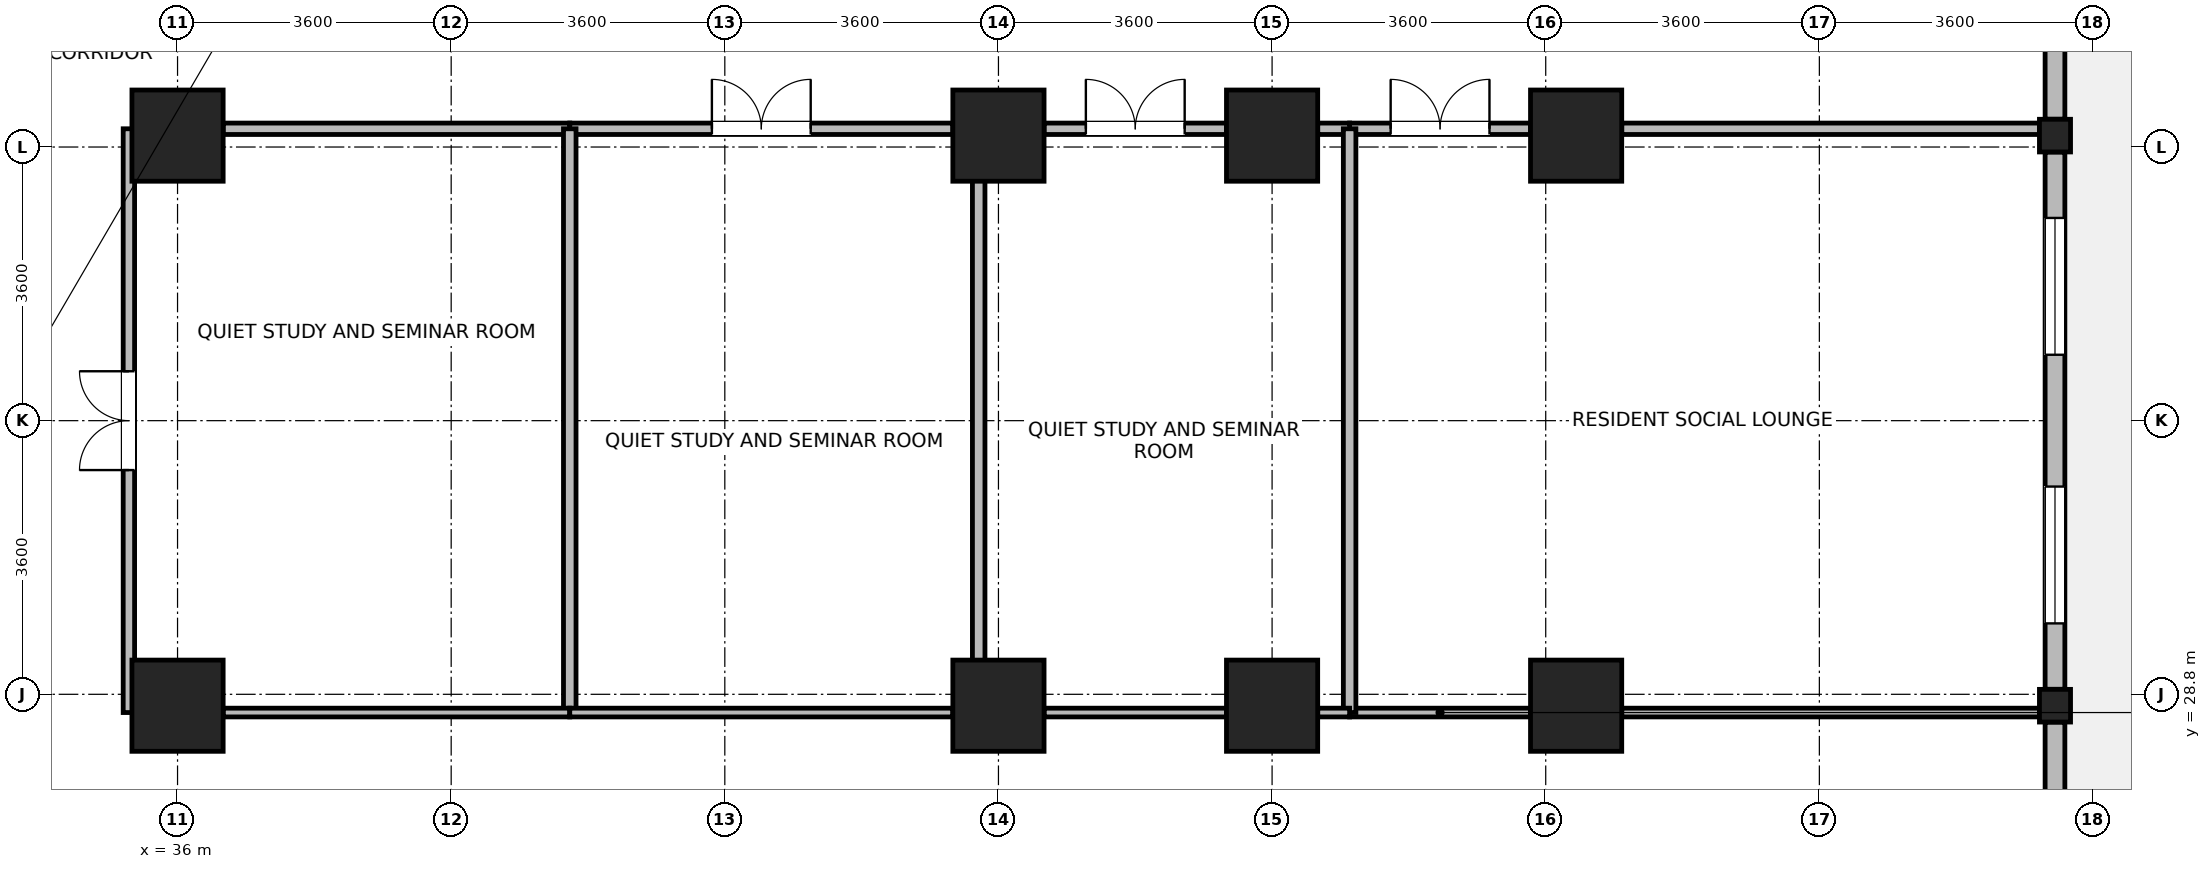
"""IFC4 building model, lengths in metres.
Left out: names, types, materials, properties, quantities, classifications, styles, units other than length and angle.
Written with IfcOpenShell. Run it as: python <this file> out.ifc"""

import sys

from ifc_helpers import new_model, si_unit, direction, frame, frame_2d, origin, origin_2d, place, context, subcontext, project, spatial, rectangle, i_section, extrude, source, transform, mapped, element, fill, save


model = new_model("IFC4")
c1 = context("Model", 3, precision=1e-05, world=origin(), true_north=direction((0.0, 1.0)))
c2 = subcontext(c1, "Body", "Model", "MODEL_VIEW")
j1 = project(units=[si_unit("LENGTHUNIT", "METRE"), si_unit("PLANEANGLEUNIT", "RADIAN")], contexts=[c1])
p1 = place(None, origin())
s1 = spatial("IfcSite", under=j1, at=p1, CompositionType="ELEMENT")
p2 = place(p1, origin())
s2 = spatial("IfcBuilding", under=s1, at=p2, CompositionType="ELEMENT")
p3 = place(p2, frame((0.0, 0.0, 104.5)))
s3 = spatial("IfcBuildingStorey", under=s2, at=p3, CompositionType="ELEMENT", Elevation=104.5)
m1 = source(origin(), c2, "Body", "SweptSolid", [
    extrude(rectangle(XDim=1.2, YDim=1.2, at=origin_2d()), origin(), (0.0, 0.0, 1.0), 3.7),
])
for number, where, z_axis, x_axis in (
    (1, (36.0, 28.65, 0.0), (0.0, 0.0, 1.0), (1.0, 0.0, 0.0)),
    (2, (36.0, 36.15, 0.0), (0.0, 0.0, 1.0), (1.0, 0.0, 0.0)),
    (3, (46.8, 28.65, 0.0), (0.0, 0.0, 1.0), (1.0, 0.0, 0.0)),
    (4, (46.8, 36.15, 0.0), (0.0, 0.0, 1.0), (1.0, 0.0, 0.0)),
    (5, (50.4, 28.65, 0.0), (0.0, 0.0, 1.0), (1.0, 0.0, 0.0)),
    (6, (50.4, 36.15, 0.0), (0.0, 0.0, 1.0), (1.0, 0.0, 0.0)),
    (7, (54.4, 28.65, 0.0), (0.0, 0.0, 1.0), (1.0, 0.0, 0.0)),
    (8, (54.4, 36.15, 0.0), (0.0, 0.0, 1.0), (1.0, 0.0, 0.0)),
):
    element("IfcColumn", number, at=place(p3, frame(where, z_axis=z_axis, x_axis=x_axis)), inside=s3, PredefinedType="COLUMN", context=c2, shape_type="MappedRepresentation", body=[
        mapped(m1, transform((0.0, 0.0, 0.0), x_axis=(1.0, 0.0, 0.0), y_axis=(0.0, 1.0, 0.0), z_axis=(0.0, 0.0, 1.0), scale=1.0)),
    ])
m2 = source(origin(), c2, "Body", "SweptSolid", [
    extrude(i_section(OverallWidth=0.409, OverallDepth=0.43, WebThickness=0.024, FlangeThickness=0.033, FilletRadius=0.015, at=origin_2d()), origin(), (0.0, 0.0, 1.0), 3.7),
])
for number, where, z_axis, x_axis in (
    (9, (60.7, 28.65, 0.0), (0.0, 0.0, 1.0), (1.0, 0.0, 0.0)),
    (10, (60.7, 36.15, 0.0), (0.0, 0.0, 1.0), (1.0, 0.0, 0.0)),
):
    element("IfcColumn", number, at=place(p3, frame(where, z_axis=z_axis, x_axis=x_axis)), inside=s3, PredefinedType="COLUMN", context=c2, shape_type="MappedRepresentation", body=[
        mapped(m2, transform((0.0, 0.0, 0.0), x_axis=(1.0, 0.0, 0.0), y_axis=(0.0, 1.0, 0.0), z_axis=(0.0, 0.0, 1.0), scale=1.0)),
    ])
p4 = place(p3, frame((60.7, 28.434, 0.0), z_axis=(0.0, 0.0, 1.0), x_axis=(0.0, -1.0, 0.0)))
e11 = element("IfcWall", 11, at=p4, inside=s3, PredefinedType="STANDARD", context=c2, shape_type="SweptSolid", body=[
    extrude(rectangle(XDim=6.618, YDim=0.26, at=frame_2d((3.309, 0.0))), origin(), (0.0, 0.0, 1.0), 2.98),
])
p5 = place(p4, frame((4.063, 0.0, 0.85)))
e12 = element("IfcOpeningElement", 12, at=p5, cuts=e11, PredefinedType="OPENING", context=c2, shape_type="SweptSolid", body=[
    extrude(rectangle(XDim=1.8, YDim=1.85, at=frame_2d((0.9, 0.925))), frame((0.0, 0.14, 0.0), z_axis=(0.0, -1.0, 0.0), x_axis=(1.0, 0.0, 0.0)), (0.0, 0.0, 1.0), 0.28),
])
p6 = place(p4, frame((2.305, 0.0, 0.85)))
e13 = element("IfcOpeningElement", 13, at=p6, cuts=e11, PredefinedType="OPENING", context=c2, shape_type="SweptSolid", body=[
    extrude(rectangle(XDim=0.95, YDim=1.75, at=frame_2d((0.475, 0.875))), frame((0.0, 0.14, 0.0), z_axis=(0.0, -1.0, 0.0), x_axis=(1.0, 0.0, 0.0)), (0.0, 0.0, 1.0), 0.28),
])
p7 = place(p3, frame((60.7, 35.934, 0.0), z_axis=(0.0, 0.0, 1.0), x_axis=(0.0, -1.0, 0.0)))
e14 = element("IfcWall", 14, at=p7, inside=s3, PredefinedType="STANDARD", context=c2, shape_type="SweptSolid", body=[
    extrude(rectangle(XDim=7.068, YDim=0.26, at=frame_2d((3.534, 0.0))), origin(), (0.0, 0.0, 1.0), 2.98),
])
p8 = place(p7, frame((0.867, 0.0, 0.85)))
e15 = element("IfcOpeningElement", 15, at=p8, cuts=e14, PredefinedType="OPENING", context=c2, shape_type="SweptSolid", body=[
    extrude(rectangle(XDim=1.8, YDim=1.85, at=frame_2d((0.9, 0.925))), frame((0.0, 0.14, 0.0), z_axis=(0.0, -1.0, 0.0), x_axis=(1.0, 0.0, 0.0)), (0.0, 0.0, 1.0), 0.28),
])
p9 = place(p7, frame((4.401, 0.0, 0.85)))
e16 = element("IfcOpeningElement", 16, at=p9, cuts=e14, PredefinedType="OPENING", context=c2, shape_type="SweptSolid", body=[
    extrude(rectangle(XDim=1.8, YDim=1.85, at=frame_2d((0.9, 0.925))), frame((0.0, 0.14, 0.0), z_axis=(0.0, -1.0, 0.0), x_axis=(1.0, 0.0, 0.0)), (0.0, 0.0, 1.0), 0.28),
])
p10 = place(p3, frame((60.7, 43.33, 0.0), z_axis=(0.0, 0.0, 1.0), x_axis=(0.0, -1.0, 0.0)))
e17 = element("IfcWall", 17, at=p10, inside=s3, PredefinedType="STANDARD", context=c2, shape_type="SweptSolid", body=[
    extrude(rectangle(XDim=6.964, YDim=0.26, at=frame_2d((3.482, 0.0))), origin(), (0.0, 0.0, 1.0), 3.43),
])
p11 = place(p10, frame((0.841, 0.0, 0.85)))
e18 = element("IfcOpeningElement", 18, at=p11, cuts=e17, PredefinedType="OPENING", context=c2, shape_type="SweptSolid", body=[
    extrude(rectangle(XDim=1.8, YDim=1.85, at=frame_2d((0.9, 0.925))), frame((0.0, 0.14, 0.0), z_axis=(0.0, -1.0, 0.0), x_axis=(1.0, 0.0, 0.0)), (0.0, 0.0, 1.0), 0.28),
])
p12 = place(p10, frame((3.007, 0.0, 0.85)))
e19 = element("IfcOpeningElement", 19, at=p12, cuts=e17, PredefinedType="OPENING", context=c2, shape_type="SweptSolid", body=[
    extrude(rectangle(XDim=0.95, YDim=1.75, at=frame_2d((0.475, 0.875))), frame((0.0, 0.14, 0.0), z_axis=(0.0, -1.0, 0.0), x_axis=(1.0, 0.0, 0.0)), (0.0, 0.0, 1.0), 0.28),
])
p13 = place(p3, frame((51.42, 36.24, 0.0), z_axis=(0.0, 0.0, 1.0), x_axis=(1.0, 0.0, 0.0)))
e20 = element("IfcWall", 20, at=p13, inside=s3, PredefinedType="PARTITIONING", context=c2, shape_type="SweptSolid", body=[
    extrude(rectangle(XDim=2.38, YDim=0.15, at=frame_2d((1.19, 0.0))), origin(), (0.0, 0.0, 1.0), 2.78),
])
p14 = place(p13, frame((0.54, 0.0, 0.0)))
e21 = element("IfcOpeningElement", 21, at=p14, cuts=e20, PredefinedType="OPENING", context=c2, shape_type="SweptSolid", body=[
    extrude(rectangle(XDim=1.3, YDim=2.12, at=frame_2d((0.65, 1.06))), frame((0.0, 0.085, 0.0), z_axis=(0.0, -1.0, 0.0), x_axis=(1.0, 0.0, 0.0)), (0.0, 0.0, 1.0), 0.17),
])
p15 = place(p3, frame((55.0, 36.24, 0.0), z_axis=(0.0, 0.0, 1.0), x_axis=(1.0, 0.0, 0.0)))
e22 = element("IfcWall", 22, at=p15, inside=s3, PredefinedType="PARTITIONING", context=c2, shape_type="SweptSolid", body=[
    extrude(rectangle(XDim=5.496, YDim=0.15, at=frame_2d((2.748, 0.0))), origin(), (0.0, 0.0, 1.0), 2.78),
])
p16 = place(p3, frame((35.36, 28.56, 0.0), z_axis=(0.0, 0.0, 1.0), x_axis=(0.0, 1.0, 0.0)))
e23 = element("IfcWall", 23, at=p16, inside=s3, PredefinedType="PARTITIONING", context=c2, shape_type="SweptSolid", body=[
    extrude(rectangle(XDim=7.68, YDim=0.15, at=frame_2d((3.84, 0.0))), origin(), (0.0, 0.0, 1.0), 3.43),
])
p17 = place(p16, frame((3.19, 0.0, 0.0)))
e24 = element("IfcOpeningElement", 24, at=p17, cuts=e23, PredefinedType="OPENING", context=c2, shape_type="SweptSolid", body=[
    extrude(rectangle(XDim=1.3, YDim=2.12, at=frame_2d((0.65, 1.06))), frame((0.0, 0.085, 0.0), z_axis=(0.0, -1.0, 0.0), x_axis=(1.0, 0.0, 0.0)), (0.0, 0.0, 1.0), 0.17),
])
p18 = place(p3, frame((36.6, 36.24, 0.0), z_axis=(0.0, 0.0, 1.0), x_axis=(1.0, 0.0, 0.0)))
e25 = element("IfcWall", 25, at=p18, inside=s3, PredefinedType="PARTITIONING", context=c2, shape_type="SweptSolid", body=[
    extrude(rectangle(XDim=4.56, YDim=0.15, at=frame_2d((2.28, 0.0))), origin(), (0.0, 0.0, 1.0), 2.78),
])
p19 = place(p3, frame((41.16, 36.24, 0.0), z_axis=(0.0, 0.0, 1.0), x_axis=(1.0, 0.0, 0.0)))
e26 = element("IfcWall", 26, at=p19, inside=s3, PredefinedType="PARTITIONING", context=c2, shape_type="SweptSolid", body=[
    extrude(rectangle(XDim=5.04, YDim=0.15, at=frame_2d((2.52, 0.0))), origin(), (0.0, 0.0, 1.0), 2.78),
])
p20 = place(p19, frame((1.87, 0.0, 0.0)))
e27 = element("IfcOpeningElement", 27, at=p20, cuts=e26, PredefinedType="OPENING", context=c2, shape_type="SweptSolid", body=[
    extrude(rectangle(XDim=1.3, YDim=2.12, at=frame_2d((0.65, 1.06))), frame((0.0, 0.085, 0.0), z_axis=(0.0, -1.0, 0.0), x_axis=(1.0, 0.0, 0.0)), (0.0, 0.0, 1.0), 0.17),
])
p21 = place(p3, frame((47.4, 36.24, 0.0), z_axis=(0.0, 0.0, 1.0), x_axis=(1.0, 0.0, 0.0)))
e28 = element("IfcWall", 28, at=p21, inside=s3, PredefinedType="PARTITIONING", context=c2, shape_type="SweptSolid", body=[
    extrude(rectangle(XDim=2.4, YDim=0.15, at=frame_2d((1.2, 0.0))), origin(), (0.0, 0.0, 1.0), 2.78),
])
p22 = place(p21, frame((0.55, 0.0, 0.0)))
e29 = element("IfcOpeningElement", 29, at=p22, cuts=e28, PredefinedType="OPENING", context=c2, shape_type="SweptSolid", body=[
    extrude(rectangle(XDim=1.3, YDim=2.12, at=frame_2d((0.65, 1.06))), frame((0.0, 0.085, 0.0), z_axis=(0.0, -1.0, 0.0), x_axis=(1.0, 0.0, 0.0)), (0.0, 0.0, 1.0), 0.17),
])
p23 = place(p3, frame((51.0, 36.24, 0.0), z_axis=(0.0, 0.0, 1.0), x_axis=(1.0, 0.0, 0.0)))
e30 = element("IfcWall", 30, at=p23, inside=s3, PredefinedType="PARTITIONING", context=c2, shape_type="SweptSolid", body=[
    extrude(rectangle(XDim=0.42, YDim=0.15, at=frame_2d((0.21, 0.0))), origin(), (0.0, 0.0, 1.0), 2.78),
])
p24 = place(p3, frame((51.42, 28.56, 0.0), z_axis=(0.0, 0.0, 1.0), x_axis=(1.0, 0.0, 0.0)))
e31 = element("IfcWall", 31, at=p24, inside=s3, PredefinedType="PARTITIONING", context=c2, shape_type="SweptSolid", body=[
    extrude(rectangle(XDim=2.38, YDim=0.115, at=frame_2d((1.19, 0.0))), origin(), (0.0, 0.0, 1.0), 2.78),
])
p25 = place(p3, frame((55.0, 28.56, 0.0), z_axis=(0.0, 0.0, 1.0), x_axis=(1.0, 0.0, 0.0)))
e32 = element("IfcWall", 32, at=p25, inside=s3, PredefinedType="PARTITIONING", context=c2, shape_type="SweptSolid", body=[
    extrude(rectangle(XDim=5.496, YDim=0.115, at=frame_2d((2.748, 0.0))), origin(), (0.0, 0.0, 1.0), 2.78),
])
for number, where, z_axis, x_axis in (
    (33, (41.16, 28.56, 0.0), (0.0, 0.0, 1.0), (0.0, 1.0, 0.0)),
    (34, (46.54, 28.56, 0.0), (0.0, 0.0, 1.0), (0.0, 1.0, 0.0)),
    (35, (51.42, 28.56, 0.0), (0.0, 0.0, 1.0), (0.0, 1.0, 0.0)),
):
    element("IfcWall", number, at=place(p3, frame(where, z_axis=z_axis, x_axis=x_axis)), inside=s3, PredefinedType="PARTITIONING", context=c2, shape_type="SweptSolid", body=[
        extrude(rectangle(XDim=7.68, YDim=0.165, at=frame_2d((3.84, 0.0))), origin(), (0.0, 0.0, 1.0), 3.43),
    ])
p26 = place(p3, frame((36.6, 28.56, 0.0), z_axis=(0.0, 0.0, 1.0), x_axis=(1.0, 0.0, 0.0)))
e36 = element("IfcWall", 36, at=p26, inside=s3, PredefinedType="PARTITIONING", context=c2, shape_type="SweptSolid", body=[
    extrude(rectangle(XDim=4.56, YDim=0.115, at=frame_2d((2.28, 0.0))), origin(), (0.0, 0.0, 1.0), 2.78),
])
p27 = place(p3, frame((41.16, 28.56, 0.0), z_axis=(0.0, 0.0, 1.0), x_axis=(1.0, 0.0, 0.0)))
e37 = element("IfcWall", 37, at=p27, inside=s3, PredefinedType="PARTITIONING", context=c2, shape_type="SweptSolid", body=[
    extrude(rectangle(XDim=5.04, YDim=0.115, at=frame_2d((2.52, 0.0))), origin(), (0.0, 0.0, 1.0), 2.78),
])
p28 = place(p3, frame((47.4, 28.56, 0.0), z_axis=(0.0, 0.0, 1.0), x_axis=(1.0, 0.0, 0.0)))
e38 = element("IfcWall", 38, at=p28, inside=s3, PredefinedType="PARTITIONING", context=c2, shape_type="SweptSolid", body=[
    extrude(rectangle(XDim=2.4, YDim=0.115, at=frame_2d((1.2, 0.0))), origin(), (0.0, 0.0, 1.0), 2.78),
])
p29 = place(p3, frame((51.0, 28.56, 0.0), z_axis=(0.0, 0.0, 1.0), x_axis=(1.0, 0.0, 0.0)))
e39 = element("IfcWall", 39, at=p29, inside=s3, PredefinedType="PARTITIONING", context=c2, shape_type="SweptSolid", body=[
    extrude(rectangle(XDim=0.42, YDim=0.115, at=frame_2d((0.21, 0.0))), origin(), (0.0, 0.0, 1.0), 2.78),
])
p30 = place(p8, origin())
e40 = element("IfcWindow", 40, at=p30, inside=s3, PartitioningType="SINGLE_PANEL", PredefinedType="WINDOW", context=c2, shape_type="SweptSolid", body=[
    extrude(rectangle(XDim=1.8, YDim=1.85, at=frame_2d((0.9, 0.925))), frame((0.0, 0.03, 0.0), z_axis=(0.0, -1.0, 0.0), x_axis=(1.0, 0.0, 0.0)), (0.0, 0.0, 1.0), 0.06),
])
fill(e15, e40)
p31 = place(p9, origin())
e41 = element("IfcWindow", 41, at=p31, inside=s3, PartitioningType="SINGLE_PANEL", PredefinedType="WINDOW", context=c2, shape_type="SweptSolid", body=[
    extrude(rectangle(XDim=1.8, YDim=1.85, at=frame_2d((0.9, 0.925))), frame((0.0, 0.03, 0.0), z_axis=(0.0, -1.0, 0.0), x_axis=(1.0, 0.0, 0.0)), (0.0, 0.0, 1.0), 0.06),
])
fill(e16, e41)
p32 = place(p14, origin())
e42 = element("IfcDoor", 42, at=p32, inside=s3, OperationType="DOUBLE_DOOR_SINGLE_SWING", PredefinedType="DOOR", context=c2, shape_type="SweptSolid", body=[
    extrude(rectangle(XDim=1.3, YDim=2.12, at=frame_2d((0.65, 1.06))), frame((0.0, 0.025, 0.0), z_axis=(0.0, -1.0, 0.0), x_axis=(1.0, 0.0, 0.0)), (0.0, 0.0, 1.0), 0.05),
])
fill(e21, e42)
p33 = place(p17, origin())
e43 = element("IfcDoor", 43, at=p33, inside=s3, OperationType="DOUBLE_DOOR_SINGLE_SWING", PredefinedType="DOOR", context=c2, shape_type="SweptSolid", body=[
    extrude(rectangle(XDim=1.3, YDim=2.12, at=frame_2d((0.65, 1.06))), frame((0.0, 0.025, 0.0), z_axis=(0.0, -1.0, 0.0), x_axis=(1.0, 0.0, 0.0)), (0.0, 0.0, 1.0), 0.05),
])
fill(e24, e43)
p34 = place(p20, origin())
e44 = element("IfcDoor", 44, at=p34, inside=s3, OperationType="DOUBLE_DOOR_SINGLE_SWING", PredefinedType="DOOR", context=c2, shape_type="SweptSolid", body=[
    extrude(rectangle(XDim=1.3, YDim=2.12, at=frame_2d((0.65, 1.06))), frame((0.0, 0.025, 0.0), z_axis=(0.0, -1.0, 0.0), x_axis=(1.0, 0.0, 0.0)), (0.0, 0.0, 1.0), 0.05),
])
fill(e27, e44)
p35 = place(p22, origin())
e45 = element("IfcDoor", 45, at=p35, inside=s3, OperationType="DOUBLE_DOOR_SINGLE_SWING", PredefinedType="DOOR", context=c2, shape_type="SweptSolid", body=[
    extrude(rectangle(XDim=1.3, YDim=2.12, at=frame_2d((0.65, 1.06))), frame((0.0, 0.025, 0.0), z_axis=(0.0, -1.0, 0.0), x_axis=(1.0, 0.0, 0.0)), (0.0, 0.0, 1.0), 0.05),
])
fill(e29, e45)
save(model, sys.argv[1])
